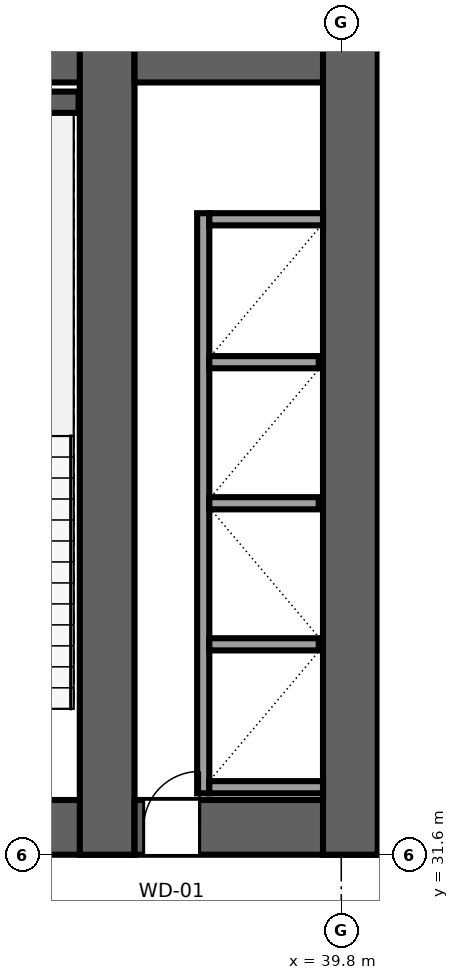
"""IFC4 building model, lengths in metres.
Left out: names, types, materials, properties, quantities, classifications, styles, units other than length and angle.
Written with IfcOpenShell. Run it as: python <this file> out.ifc"""

import sys

from ifc_helpers import new_model, si_unit, direction, frame, frame_2d, origin, place, context, subcontext, project, spatial, rectangle, extrude, source, transform, mapped, element, fill, save


model = new_model("IFC4")
c1 = context("Model", 3, precision=1e-05, world=origin(), true_north=direction((0.0, 1.0)))
c2 = subcontext(c1, "Body", "Model", "MODEL_VIEW")
j1 = project(units=[si_unit("LENGTHUNIT", "METRE"), si_unit("PLANEANGLEUNIT", "RADIAN")], contexts=[c1])
p1 = place(None, origin())
s1 = spatial("IfcSite", under=j1, at=p1, CompositionType="ELEMENT")
p2 = place(p1, origin())
s2 = spatial("IfcBuilding", under=s1, at=p2, CompositionType="ELEMENT")
p3 = place(p2, frame((0.0, 0.0, 6.0)))
s3 = spatial("IfcBuildingStorey", under=s2, at=p3, CompositionType="ELEMENT", Elevation=6.0)
p4 = place(p3, frame((9.6, 32.05, 0.0), z_axis=(0.0, 0.0, 1.0), x_axis=(1.0, 0.0, 0.0)))
e1 = element("IfcWall", 1, at=p4, inside=s3, PredefinedType="SHEAR", context=c2, shape_type="SweptSolid", body=[
    extrude(rectangle(XDim=26.8, YDim=0.9, at=frame_2d((13.4, 0.0))), origin(), (0.0, 0.0, 1.0), 5.0),
])
p5 = place(p4, frame((6.52, 0.0, 0.0), z_axis=(0.0, 0.0, 1.0), x_axis=(-1.0, 0.0, 0.0)))
e2 = element("IfcOpeningElement", 2, at=p5, cuts=e1, PredefinedType="OPENING", context=c2, shape_type="SweptSolid", body=[
    extrude(rectangle(XDim=1.5, YDim=2.04, at=frame_2d((0.75, 1.02))), frame((0.0, 0.46, 0.0), z_axis=(0.0, -1.0, 0.0), x_axis=(1.0, 0.0, 0.0)), (0.0, 0.0, 1.0), 0.92),
])
p6 = place(p4, frame((14.15, 0.0, 0.0), z_axis=(0.0, 0.0, 1.0), x_axis=(-1.0, 0.0, 0.0)))
e3 = element("IfcOpeningElement", 3, at=p6, cuts=e1, PredefinedType="OPENING", context=c2, shape_type="SweptSolid", body=[
    extrude(rectangle(XDim=1.5, YDim=2.04, at=frame_2d((0.75, 1.02))), frame((0.0, 0.46, 0.0), z_axis=(0.0, -1.0, 0.0), x_axis=(1.0, 0.0, 0.0)), (0.0, 0.0, 1.0), 0.92),
])
p7 = place(p4, frame((20.45, 0.0, 0.0), z_axis=(0.0, 0.0, 1.0), x_axis=(-1.0, 0.0, 0.0)))
e4 = element("IfcOpeningElement", 4, at=p7, cuts=e1, PredefinedType="OPENING", context=c2, shape_type="SweptSolid", body=[
    extrude(rectangle(XDim=1.5, YDim=2.04, at=frame_2d((0.75, 1.02))), frame((0.0, 0.46, 0.0), z_axis=(0.0, -1.0, 0.0), x_axis=(1.0, 0.0, 0.0)), (0.0, 0.0, 1.0), 0.92),
])
p8 = place(p4, frame((8.57, 0.0, 0.0), z_axis=(0.0, 0.0, 1.0), x_axis=(-1.0, 0.0, 0.0)))
e5 = element("IfcOpeningElement", 5, at=p8, cuts=e1, PredefinedType="OPENING", context=c2, shape_type="SweptSolid", body=[
    extrude(rectangle(XDim=0.82, YDim=2.01, at=frame_2d((0.41, 1.005))), frame((0.0, 0.46, 0.0), z_axis=(0.0, -1.0, 0.0), x_axis=(1.0, 0.0, 0.0)), (0.0, 0.0, 1.0), 0.92),
])
p9 = place(p3, frame((9.6, 44.75, 0.0), z_axis=(0.0, 0.0, 1.0), x_axis=(1.0, 0.0, 0.0)))
e6 = element("IfcWall", 6, at=p9, inside=s3, PredefinedType="SHEAR", context=c2, shape_type="SweptSolid", body=[
    extrude(rectangle(XDim=26.8, YDim=0.9, at=frame_2d((13.4, 0.0))), origin(), (0.0, 0.0, 1.0), 5.0),
])
p10 = place(p3, frame((35.95, 31.6, 0.0), z_axis=(0.0, 0.0, 1.0), x_axis=(0.0, 1.0, 0.0)))
e7 = element("IfcWall", 7, at=p10, inside=s3, PredefinedType="SHEAR", context=c2, shape_type="SweptSolid", body=[
    extrude(rectangle(XDim=13.6, YDim=0.9, at=frame_2d((6.8, 0.0))), origin(), (0.0, 0.0, 1.0), 5.0),
])
p11 = place(p3, frame((36.4, 32.05, 0.0), z_axis=(0.0, 0.0, 1.0), x_axis=(1.0, 0.0, 0.0)))
e8 = element("IfcWall", 8, at=p11, inside=s3, PredefinedType="SHEAR", context=c2, shape_type="SweptSolid", body=[
    extrude(rectangle(XDim=4.0, YDim=0.9, at=frame_2d((2.0, 0.0))), origin(), (0.0, 0.0, 1.0), 5.0),
])
p12 = place(p11, frame((1.07, 0.0, 0.0), z_axis=(0.0, 0.0, 1.0), x_axis=(-1.0, 0.0, 0.0)))
e9 = element("IfcOpeningElement", 9, at=p12, cuts=e8, PredefinedType="OPENING", context=c2, shape_type="SweptSolid", body=[
    extrude(rectangle(XDim=0.92, YDim=2.01, at=frame_2d((0.46, 1.005))), frame((0.0, 0.46, 0.0), z_axis=(0.0, -1.0, 0.0), x_axis=(1.0, 0.0, 0.0)), (0.0, 0.0, 1.0), 0.92),
])
p13 = place(p3, frame((36.4, 44.75, 0.0), z_axis=(0.0, 0.0, 1.0), x_axis=(1.0, 0.0, 0.0)))
e10 = element("IfcWall", 10, at=p13, inside=s3, PredefinedType="SHEAR", context=c2, shape_type="SweptSolid", body=[
    extrude(rectangle(XDim=4.0, YDim=0.9, at=frame_2d((2.0, 0.0))), origin(), (0.0, 0.0, 1.0), 5.0),
])
p14 = place(p3, frame((39.95, 31.6, 0.0), z_axis=(0.0, 0.0, 1.0), x_axis=(0.0, 1.0, 0.0)))
e11 = element("IfcWall", 11, at=p14, inside=s3, PredefinedType="SHEAR", context=c2, shape_type="SweptSolid", body=[
    extrude(rectangle(XDim=13.6, YDim=0.9, at=frame_2d((6.8, 0.0))), origin(), (0.0, 0.0, 1.0), 5.0),
])
p15 = place(p3, frame((31.88, 43.975, 0.0), z_axis=(0.0, 0.0, 1.0), x_axis=(1.0, 0.0, 0.0)))
e12 = element("IfcWall", 12, at=p15, inside=s3, PredefinedType="SHEAR", context=c2, shape_type="SweptSolid", body=[
    extrude(rectangle(XDim=3.6, YDim=0.35, at=frame_2d((1.8, 0.0))), origin(), (0.0, 0.0, 1.0), 5.0),
])
p16 = place(p3, frame((37.53, 32.61, 0.0), z_axis=(0.0, 0.0, 1.0), x_axis=(0.0, 1.0, 0.0)))
e13 = element("IfcWall", 13, at=p16, inside=s3, PredefinedType="SOLIDWALL", context=c2, shape_type="SweptSolid", body=[
    extrude(rectangle(XDim=9.54, YDim=0.2, at=frame_2d((4.77, 0.0))), origin(), (0.0, 0.0, 1.0), 4.74),
])
for number, where, z_axis, x_axis in (
    (14, (37.63, 32.71, 0.0), (0.0, 0.0, 1.0), (1.0, 0.0, 0.0)),
    (15, (37.63, 42.05, 0.0), (0.0, 0.0, 1.0), (1.0, 0.0, 0.0)),
):
    element("IfcWall", number, at=place(p3, frame(where, z_axis=z_axis, x_axis=x_axis)), inside=s3, PredefinedType="SOLIDWALL", context=c2, shape_type="SweptSolid", body=[
        extrude(rectangle(XDim=1.87, YDim=0.2, at=frame_2d((0.935, 0.0))), origin(), (0.0, 0.0, 1.0), 4.74),
    ])
for number, where, z_axis, x_axis in (
    (16, (37.63, 35.06, 0.0), (0.0, 0.0, 1.0), (1.0, 0.0, 0.0)),
    (17, (37.63, 37.38, 0.0), (0.0, 0.0, 1.0), (1.0, 0.0, 0.0)),
    (18, (37.63, 39.7, 0.0), (0.0, 0.0, 1.0), (1.0, 0.0, 0.0)),
):
    element("IfcWall", number, at=place(p3, frame(where, z_axis=z_axis, x_axis=x_axis)), inside=s3, PredefinedType="SOLIDWALL", context=c2, shape_type="SweptSolid", body=[
        extrude(rectangle(XDim=1.8, YDim=0.2, at=frame_2d((0.9, 0.0))), origin(), (0.0, 0.0, 1.0), 4.74),
    ])
m1 = source(origin(), c2, "Body", "SweptSolid", [
    extrude(rectangle(XDim=0.92, YDim=2.01, at=frame_2d((0.46, 1.005))), frame((0.0, 0.025, 0.0), z_axis=(0.0, -1.0, 0.0), x_axis=(1.0, 0.0, 0.0)), (0.0, 0.0, 1.0), 0.05),
])
p17 = place(p12, origin())
e19 = element("IfcDoor", 19, at=p17, inside=s3, OperationType="SINGLE_SWING_RIGHT", PredefinedType="DOOR", context=c2, shape_type="MappedRepresentation", body=[
    mapped(m1, transform((0.0, 0.0, 0.0), x_axis=(1.0, 0.0, 0.0), y_axis=(0.0, 1.0, 0.0), z_axis=(0.0, 0.0, 1.0), scale=1.0)),
])
fill(e9, e19)
save(model, sys.argv[1])
